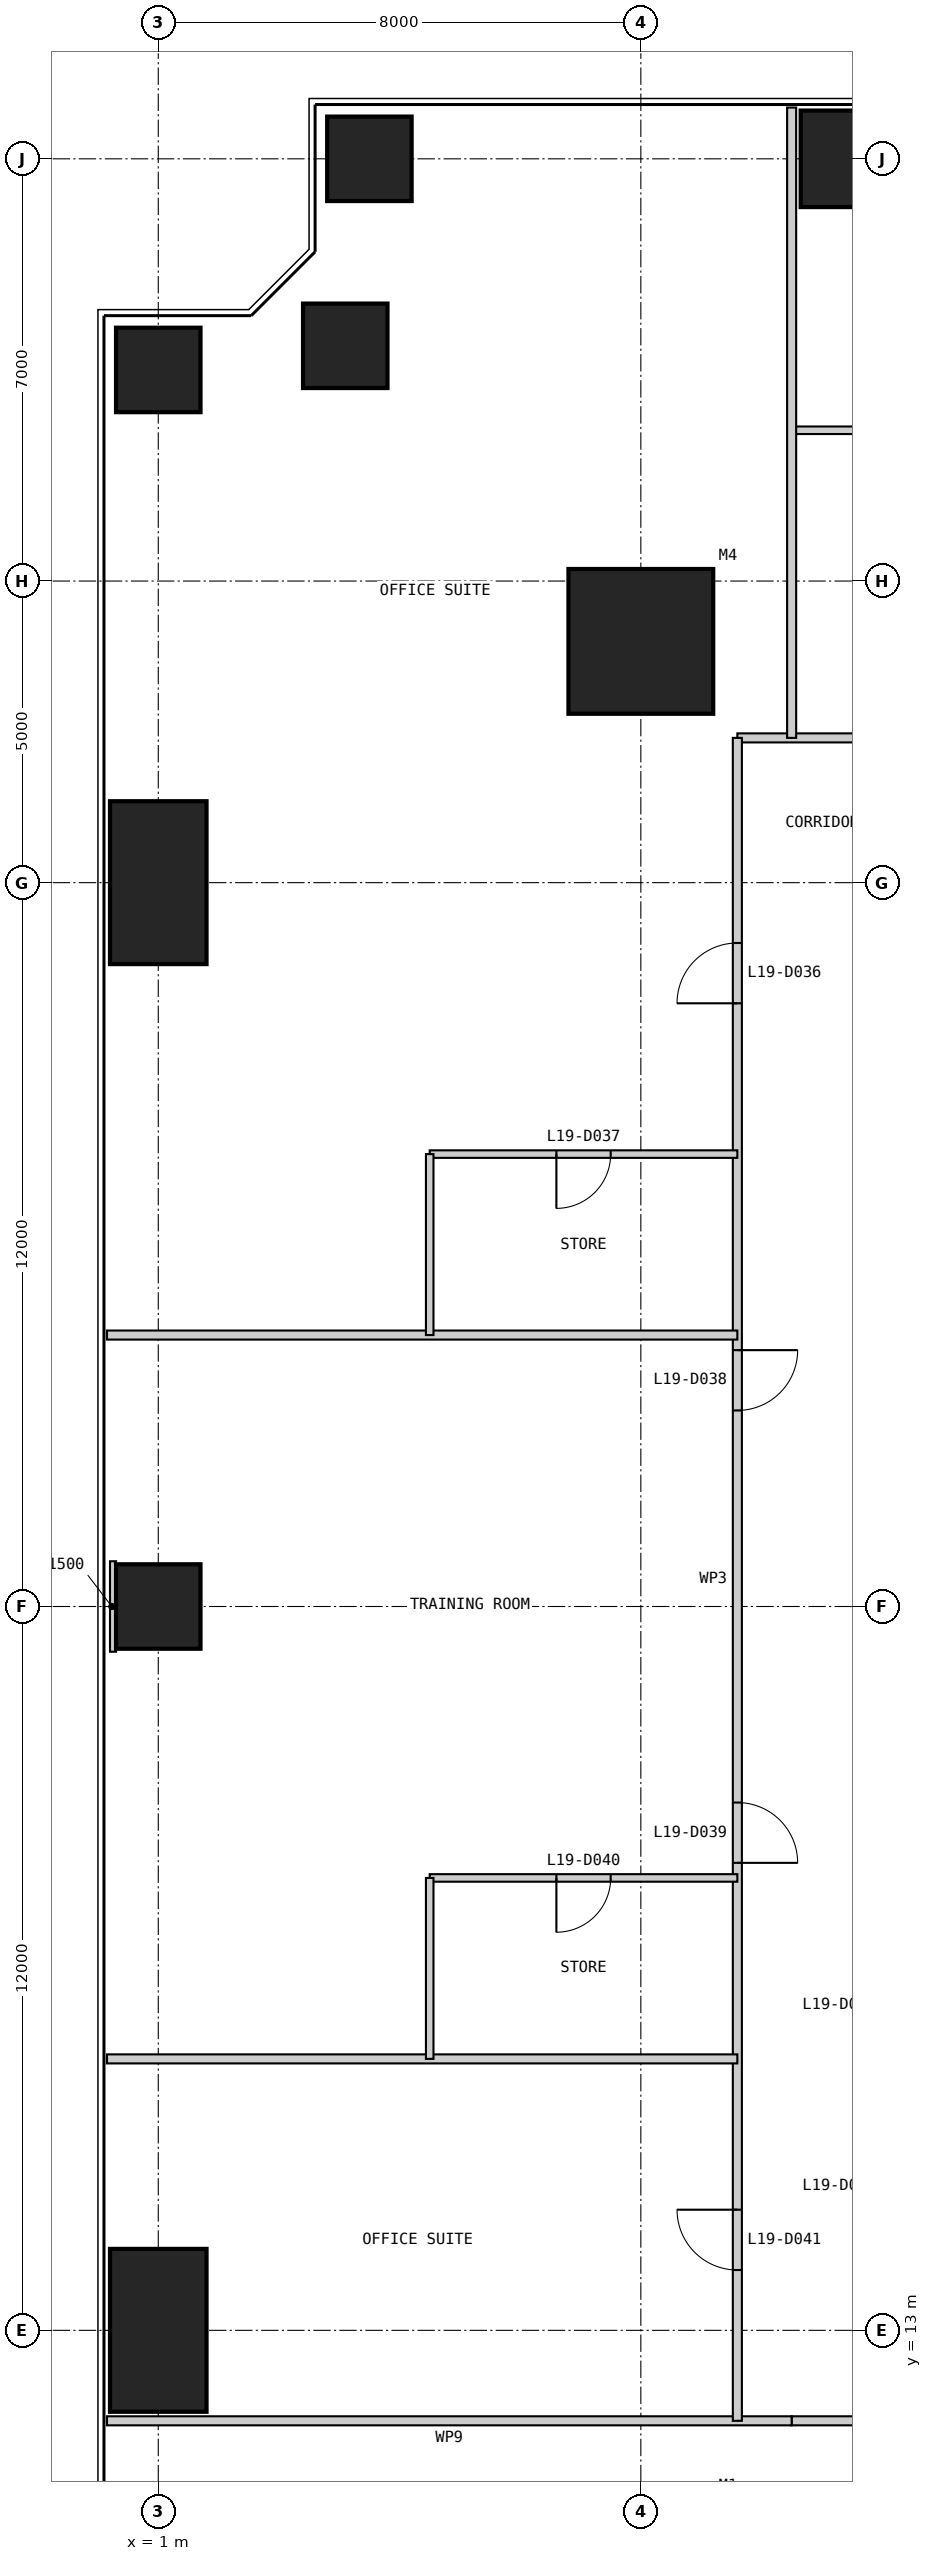
"""IFC4 building model, lengths in metres.
Left out: names, types, materials, properties, quantities, classifications, styles, units other than length and angle.
Written with IfcOpenShell. Run it as: python <this file> out.ifc"""

import sys

from ifc_helpers import new_model, si_unit, direction, frame, frame_2d, origin, origin_2d, place, context, subcontext, project, spatial, rectangle, extrude, element, fill, save


model = new_model("IFC4")
c1 = context("Model", 3, precision=1e-05, world=origin(), true_north=direction((0.0, 1.0)))
c2 = subcontext(c1, "Body", "Model", "MODEL_VIEW")
j1 = project(units=[si_unit("LENGTHUNIT", "METRE"), si_unit("PLANEANGLEUNIT", "RADIAN")], contexts=[c1])
p1 = place(None, origin())
s1 = spatial("IfcSite", under=j1, at=p1, CompositionType="ELEMENT")
p2 = place(p1, origin())
s2 = spatial("IfcBuilding", under=s1, at=p2, CompositionType="ELEMENT")
p3 = place(p2, frame((0.0, 0.0, 83.0)))
s3 = spatial("IfcBuildingStorey", under=s2, at=p3, CompositionType="ELEMENT", Elevation=83.0)
p4 = place(p3, frame((9.0, 41.0, 0.0), z_axis=(0.0, 0.0, 1.0), x_axis=(1.0, 0.0, 0.0)))
e1 = element("IfcColumn", 1, at=p4, inside=s3, PredefinedType="COLUMN", context=c2, shape_type="SweptSolid", body=[
    extrude(rectangle(XDim=2.4, YDim=2.4, at=origin_2d()), origin(), (0.0, 0.0, 1.0), 4.0),
])
p5 = place(p3, frame((13.0, 49.0, 0.0), z_axis=(0.0, 0.0, 1.0), x_axis=(1.0, 0.0, 0.0)))
e2 = element("IfcColumn", 2, at=p5, inside=s3, PredefinedType="COLUMN", context=c2, shape_type="SweptSolid", body=[
    extrude(rectangle(XDim=2.7, YDim=1.6, at=origin_2d()), origin(), (0.0, 0.0, 1.0), 4.0),
])
for number, where, z_axis, x_axis in (
    (3, (4.5, 49.0, 0.0), (0.0, 0.0, 1.0), (1.0, 0.0, 0.0)),
    (4, (4.1, 45.9, 0.0), (0.0, 0.0, 1.0), (1.0, 0.0, 0.0)),
    (5, (1.0, 45.5, 0.0), (0.0, 0.0, 1.0), (1.0, 0.0, 0.0)),
):
    element("IfcColumn", number, at=place(p3, frame(where, z_axis=z_axis, x_axis=x_axis)), inside=s3, PredefinedType="COLUMN", context=c2, shape_type="SweptSolid", body=[
        extrude(rectangle(XDim=1.4, YDim=1.4, at=origin_2d()), origin(), (0.0, 0.0, 1.0), 4.0),
    ])
p6 = place(p3, frame((1.0, 37.0, 0.0), z_axis=(0.0, 0.0, 1.0), x_axis=(1.0, 0.0, 0.0)))
e6 = element("IfcColumn", 6, at=p6, inside=s3, PredefinedType="COLUMN", context=c2, shape_type="SweptSolid", body=[
    extrude(rectangle(XDim=1.6, YDim=2.7, at=origin_2d()), origin(), (0.0, 0.0, 1.0), 4.0),
])
p7 = place(p3, frame((1.0, 25.0, 0.0), z_axis=(0.0, 0.0, 1.0), x_axis=(1.0, 0.0, 0.0)))
e7 = element("IfcColumn", 7, at=p7, inside=s3, PredefinedType="COLUMN", context=c2, shape_type="SweptSolid", body=[
    extrude(rectangle(XDim=1.4, YDim=1.4, at=origin_2d()), origin(), (0.0, 0.0, 1.0), 4.0),
])
p8 = place(p3, frame((1.0, 13.0, 0.0), z_axis=(0.0, 0.0, 1.0), x_axis=(1.0, 0.0, 0.0)))
e8 = element("IfcColumn", 8, at=p8, inside=s3, PredefinedType="COLUMN", context=c2, shape_type="SweptSolid", body=[
    extrude(rectangle(XDim=1.6, YDim=2.7, at=origin_2d()), origin(), (0.0, 0.0, 1.0), 4.0),
])
p9 = place(p3, frame((11.5, 11.5, 0.0), z_axis=(0.0, 0.0, 1.0), x_axis=(1.0, 0.0, 0.0)))
e9 = element("IfcWall", 9, at=p9, inside=s3, PredefinedType="PARTITIONING", context=c2, shape_type="SweptSolid", body=[
    extrude(rectangle(XDim=27.0, YDim=0.15, at=frame_2d((13.5, 0.0))), origin(), (0.0, 0.0, 1.0), 3.85),
])
p10 = place(p9, frame((11.5, 0.0, 0.0)))
e10 = element("IfcOpeningElement", 10, at=p10, cuts=e9, PredefinedType="OPENING", context=c2, shape_type="SweptSolid", body=[
    extrude(rectangle(XDim=1.0, YDim=2.2, at=frame_2d((0.5, 1.1))), frame((0.0, 0.085, 0.0), z_axis=(0.0, -1.0, 0.0), x_axis=(1.0, 0.0, 0.0)), (0.0, 0.0, 1.0), 0.17),
])
p11 = place(p3, frame((0.15, 11.5, 0.0), z_axis=(0.0, 0.0, 1.0), x_axis=(1.0, 0.0, 0.0)))
e11 = element("IfcWall", 11, at=p11, inside=s3, PredefinedType="PARTITIONING", context=c2, shape_type="SweptSolid", body=[
    extrude(rectangle(XDim=11.35, YDim=0.15, at=frame_2d((5.675, 0.0))), origin(), (0.0, 0.0, 1.0), 3.85),
])
p12 = place(p3, frame((39.4, 39.4, 0.0), z_axis=(0.0, 0.0, 1.0), x_axis=(-1.0, 0.0, 0.0)))
e12 = element("IfcWall", 12, at=p12, inside=s3, PredefinedType="PARTITIONING", context=c2, shape_type="SweptSolid", body=[
    extrude(rectangle(XDim=28.8, YDim=0.15, at=frame_2d((14.4, 0.0))), origin(), (0.0, 0.0, 1.0), 3.85),
])
p13 = place(p12, frame((1.15, 0.0, 0.0)))
e13 = element("IfcOpeningElement", 13, at=p13, cuts=e12, PredefinedType="OPENING", context=c2, shape_type="SweptSolid", body=[
    extrude(rectangle(XDim=1.0, YDim=2.2, at=frame_2d((0.5, 1.1))), frame((0.0, 0.085, 0.0), z_axis=(0.0, -1.0, 0.0), x_axis=(1.0, 0.0, 0.0)), (0.0, 0.0, 1.0), 0.17),
])
p14 = place(p12, frame((23.65, 0.0, 0.0)))
e14 = element("IfcOpeningElement", 14, at=p14, cuts=e12, PredefinedType="OPENING", context=c2, shape_type="SweptSolid", body=[
    extrude(rectangle(XDim=1.0, YDim=2.2, at=frame_2d((0.5, 1.1))), frame((0.0, 0.085, 0.0), z_axis=(0.0, -1.0, 0.0), x_axis=(1.0, 0.0, 0.0)), (0.0, 0.0, 1.0), 0.17),
])
p15 = place(p3, frame((29.5, 44.5, 0.0), z_axis=(0.0, 0.0, 1.0), x_axis=(-1.0, 0.0, 0.0)))
e15 = element("IfcWall", 15, at=p15, inside=s3, PredefinedType="PARTITIONING", context=c2, shape_type="SweptSolid", body=[
    extrude(rectangle(XDim=18.0, YDim=0.125, at=frame_2d((9.0, 0.0))), origin(), (0.0, 0.0, 1.0), 3.85),
])
p16 = place(p15, frame((10.0, 0.0, 0.0)))
e16 = element("IfcOpeningElement", 16, at=p16, cuts=e15, PredefinedType="OPENING", context=c2, shape_type="SweptSolid", body=[
    extrude(rectangle(XDim=1.0, YDim=2.2, at=frame_2d((0.5, 1.1))), frame((0.0, 0.073, 0.0), z_axis=(0.0, -1.0, 0.0), x_axis=(1.0, 0.0, 0.0)), (0.0, 0.0, 1.0), 0.145),
])
p17 = place(p15, frame((13.05, 0.0, 0.0)))
e17 = element("IfcOpeningElement", 17, at=p17, cuts=e15, PredefinedType="OPENING", context=c2, shape_type="SweptSolid", body=[
    extrude(rectangle(XDim=0.9, YDim=2.2, at=frame_2d((0.45, 1.1))), frame((0.0, 0.073, 0.0), z_axis=(0.0, -1.0, 0.0), x_axis=(1.0, 0.0, 0.0)), (0.0, 0.0, 1.0), 0.145),
])
p18 = place(p3, frame((10.6, 39.4, 0.0), z_axis=(0.0, 0.0, 1.0), x_axis=(0.0, -1.0, 0.0)))
e18 = element("IfcWall", 18, at=p18, inside=s3, PredefinedType="PARTITIONING", context=c2, shape_type="SweptSolid", body=[
    extrude(rectangle(XDim=27.9, YDim=0.15, at=frame_2d((13.95, 0.0))), origin(), (0.0, 0.0, 1.0), 3.85),
])
p19 = place(p18, frame((3.4, 0.0, 0.0)))
e19 = element("IfcOpeningElement", 19, at=p19, cuts=e18, PredefinedType="OPENING", context=c2, shape_type="SweptSolid", body=[
    extrude(rectangle(XDim=1.0, YDim=2.2, at=frame_2d((0.5, 1.1))), frame((0.0, 0.085, 0.0), z_axis=(0.0, -1.0, 0.0), x_axis=(1.0, 0.0, 0.0)), (0.0, 0.0, 1.0), 0.17),
])
p20 = place(p18, frame((10.15, 0.0, 0.0)))
e20 = element("IfcOpeningElement", 20, at=p20, cuts=e18, PredefinedType="OPENING", context=c2, shape_type="SweptSolid", body=[
    extrude(rectangle(XDim=1.0, YDim=2.2, at=frame_2d((0.5, 1.1))), frame((0.0, 0.085, 0.0), z_axis=(0.0, -1.0, 0.0), x_axis=(1.0, 0.0, 0.0)), (0.0, 0.0, 1.0), 0.17),
])
p21 = place(p18, frame((17.65, 0.0, 0.0)))
e21 = element("IfcOpeningElement", 21, at=p21, cuts=e18, PredefinedType="OPENING", context=c2, shape_type="SweptSolid", body=[
    extrude(rectangle(XDim=1.0, YDim=2.2, at=frame_2d((0.5, 1.1))), frame((0.0, 0.085, 0.0), z_axis=(0.0, -1.0, 0.0), x_axis=(1.0, 0.0, 0.0)), (0.0, 0.0, 1.0), 0.17),
])
p22 = place(p18, frame((24.4, 0.0, 0.0)))
e22 = element("IfcOpeningElement", 22, at=p22, cuts=e18, PredefinedType="OPENING", context=c2, shape_type="SweptSolid", body=[
    extrude(rectangle(XDim=1.0, YDim=2.2, at=frame_2d((0.5, 1.1))), frame((0.0, 0.085, 0.0), z_axis=(0.0, -1.0, 0.0), x_axis=(1.0, 0.0, 0.0)), (0.0, 0.0, 1.0), 0.17),
])
p23 = place(p3, frame((11.5, 49.85, 0.0), z_axis=(0.0, 0.0, 1.0), x_axis=(0.0, -1.0, 0.0)))
e23 = element("IfcWall", 23, at=p23, inside=s3, PredefinedType="PARTITIONING", context=c2, shape_type="SweptSolid", body=[
    extrude(rectangle(XDim=10.45, YDim=0.15, at=frame_2d((5.225, 0.0))), origin(), (0.0, 0.0, 1.0), 3.85),
])
p24 = place(p3, frame((5.5, 32.5, 0.0), z_axis=(0.0, 0.0, 1.0), x_axis=(1.0, 0.0, 0.0)))
e24 = element("IfcWall", 24, at=p24, inside=s3, PredefinedType="PARTITIONING", context=c2, shape_type="SweptSolid", body=[
    extrude(rectangle(XDim=5.1, YDim=0.125, at=frame_2d((2.55, 0.0))), origin(), (0.0, 0.0, 1.0), 3.85),
])
p25 = place(p24, frame((2.1, 0.0, 0.0)))
e25 = element("IfcOpeningElement", 25, at=p25, cuts=e24, PredefinedType="OPENING", context=c2, shape_type="SweptSolid", body=[
    extrude(rectangle(XDim=0.9, YDim=2.2, at=frame_2d((0.45, 1.1))), frame((0.0, 0.073, 0.0), z_axis=(0.0, -1.0, 0.0), x_axis=(1.0, 0.0, 0.0)), (0.0, 0.0, 1.0), 0.145),
])
p26 = place(p3, frame((0.15, 29.5, 0.0), z_axis=(0.0, 0.0, 1.0), x_axis=(1.0, 0.0, 0.0)))
e26 = element("IfcWall", 26, at=p26, inside=s3, PredefinedType="PARTITIONING", context=c2, shape_type="SweptSolid", body=[
    extrude(rectangle(XDim=10.45, YDim=0.15, at=frame_2d((5.225, 0.0))), origin(), (0.0, 0.0, 1.0), 3.85),
])
p27 = place(p3, frame((5.5, 20.5, 0.0), z_axis=(0.0, 0.0, 1.0), x_axis=(1.0, 0.0, 0.0)))
e27 = element("IfcWall", 27, at=p27, inside=s3, PredefinedType="PARTITIONING", context=c2, shape_type="SweptSolid", body=[
    extrude(rectangle(XDim=5.1, YDim=0.125, at=frame_2d((2.55, 0.0))), origin(), (0.0, 0.0, 1.0), 3.85),
])
p28 = place(p27, frame((2.1, 0.0, 0.0)))
e28 = element("IfcOpeningElement", 28, at=p28, cuts=e27, PredefinedType="OPENING", context=c2, shape_type="SweptSolid", body=[
    extrude(rectangle(XDim=0.9, YDim=2.2, at=frame_2d((0.45, 1.1))), frame((0.0, 0.073, 0.0), z_axis=(0.0, -1.0, 0.0), x_axis=(1.0, 0.0, 0.0)), (0.0, 0.0, 1.0), 0.145),
])
p29 = place(p3, frame((0.15, 17.5, 0.0), z_axis=(0.0, 0.0, 1.0), x_axis=(1.0, 0.0, 0.0)))
e29 = element("IfcWall", 29, at=p29, inside=s3, PredefinedType="PARTITIONING", context=c2, shape_type="SweptSolid", body=[
    extrude(rectangle(XDim=10.45, YDim=0.15, at=frame_2d((5.225, 0.0))), origin(), (0.0, 0.0, 1.0), 3.85),
])
for number, where, z_axis, x_axis in (
    (30, (5.5, 32.5, 0.0), (0.0, 0.0, 1.0), (0.0, -1.0, 0.0)),
    (31, (5.5, 20.5, 0.0), (0.0, 0.0, 1.0), (0.0, -1.0, 0.0)),
):
    element("IfcWall", number, at=place(p3, frame(where, z_axis=z_axis, x_axis=x_axis)), inside=s3, PredefinedType="PARTITIONING", context=c2, shape_type="SweptSolid", body=[
        extrude(rectangle(XDim=3.0, YDim=0.125, at=frame_2d((1.5, 0.0))), origin(), (0.0, 0.0, 1.0), 3.85),
    ])
p30 = place(p3, frame((0.2, 25.0, 0.0), z_axis=(0.0, 0.0, 1.0), x_axis=(1.0, 0.0, 0.0)))
e32 = element("IfcWall", 32, at=p30, inside=s3, PredefinedType="PARTITIONING", context=c2, shape_type="SweptSolid", body=[
    extrude(rectangle(XDim=0.1, YDim=1.5, at=frame_2d((0.05, 0.0))), origin(), (0.0, 0.0, 1.0), 3.85),
])
p31 = place(p19, frame((1.0, 0.0, 0.0), z_axis=(0.0, 0.0, 1.0), x_axis=(-1.0, 0.0, 0.0)))
e33 = element("IfcDoor", 33, at=p31, inside=s3, OperationType="SINGLE_SWING_LEFT", PredefinedType="DOOR", context=c2, shape_type="SweptSolid", body=[
    extrude(rectangle(XDim=1.0, YDim=2.2, at=frame_2d((0.5, 1.1))), frame((0.0, 0.025, 0.0), z_axis=(0.0, -1.0, 0.0), x_axis=(1.0, 0.0, 0.0)), (0.0, 0.0, 1.0), 0.05),
])
fill(e19, e33)
p32 = place(p25, frame((0.9, 0.0, 0.0), z_axis=(0.0, 0.0, 1.0), x_axis=(-1.0, 0.0, 0.0)))
e34 = element("IfcDoor", 34, at=p32, inside=s3, OperationType="SINGLE_SWING_RIGHT", PredefinedType="DOOR", context=c2, shape_type="SweptSolid", body=[
    extrude(rectangle(XDim=0.9, YDim=2.2, at=frame_2d((0.45, 1.1))), frame((0.0, 0.025, 0.0), z_axis=(0.0, -1.0, 0.0), x_axis=(1.0, 0.0, 0.0)), (0.0, 0.0, 1.0), 0.05),
])
fill(e25, e34)
p33 = place(p20, origin())
e35 = element("IfcDoor", 35, at=p33, inside=s3, OperationType="SINGLE_SWING_LEFT", PredefinedType="DOOR", context=c2, shape_type="SweptSolid", body=[
    extrude(rectangle(XDim=1.0, YDim=2.2, at=frame_2d((0.5, 1.1))), frame((0.0, 0.025, 0.0), z_axis=(0.0, -1.0, 0.0), x_axis=(1.0, 0.0, 0.0)), (0.0, 0.0, 1.0), 0.05),
])
fill(e20, e35)
p34 = place(p21, origin())
e36 = element("IfcDoor", 36, at=p34, inside=s3, OperationType="SINGLE_SWING_RIGHT", PredefinedType="DOOR", context=c2, shape_type="SweptSolid", body=[
    extrude(rectangle(XDim=1.0, YDim=2.2, at=frame_2d((0.5, 1.1))), frame((0.0, 0.025, 0.0), z_axis=(0.0, -1.0, 0.0), x_axis=(1.0, 0.0, 0.0)), (0.0, 0.0, 1.0), 0.05),
])
fill(e21, e36)
p35 = place(p28, frame((0.9, 0.0, 0.0), z_axis=(0.0, 0.0, 1.0), x_axis=(-1.0, 0.0, 0.0)))
e37 = element("IfcDoor", 37, at=p35, inside=s3, OperationType="SINGLE_SWING_RIGHT", PredefinedType="DOOR", context=c2, shape_type="SweptSolid", body=[
    extrude(rectangle(XDim=0.9, YDim=2.2, at=frame_2d((0.45, 1.1))), frame((0.0, 0.025, 0.0), z_axis=(0.0, -1.0, 0.0), x_axis=(1.0, 0.0, 0.0)), (0.0, 0.0, 1.0), 0.05),
])
fill(e28, e37)
p36 = place(p22, frame((1.0, 0.0, 0.0), z_axis=(0.0, 0.0, 1.0), x_axis=(-1.0, 0.0, 0.0)))
e38 = element("IfcDoor", 38, at=p36, inside=s3, OperationType="SINGLE_SWING_RIGHT", PredefinedType="DOOR", context=c2, shape_type="SweptSolid", body=[
    extrude(rectangle(XDim=1.0, YDim=2.2, at=frame_2d((0.5, 1.1))), frame((0.0, 0.025, 0.0), z_axis=(0.0, -1.0, 0.0), x_axis=(1.0, 0.0, 0.0)), (0.0, 0.0, 1.0), 0.05),
])
fill(e22, e38)
save(model, sys.argv[1])
